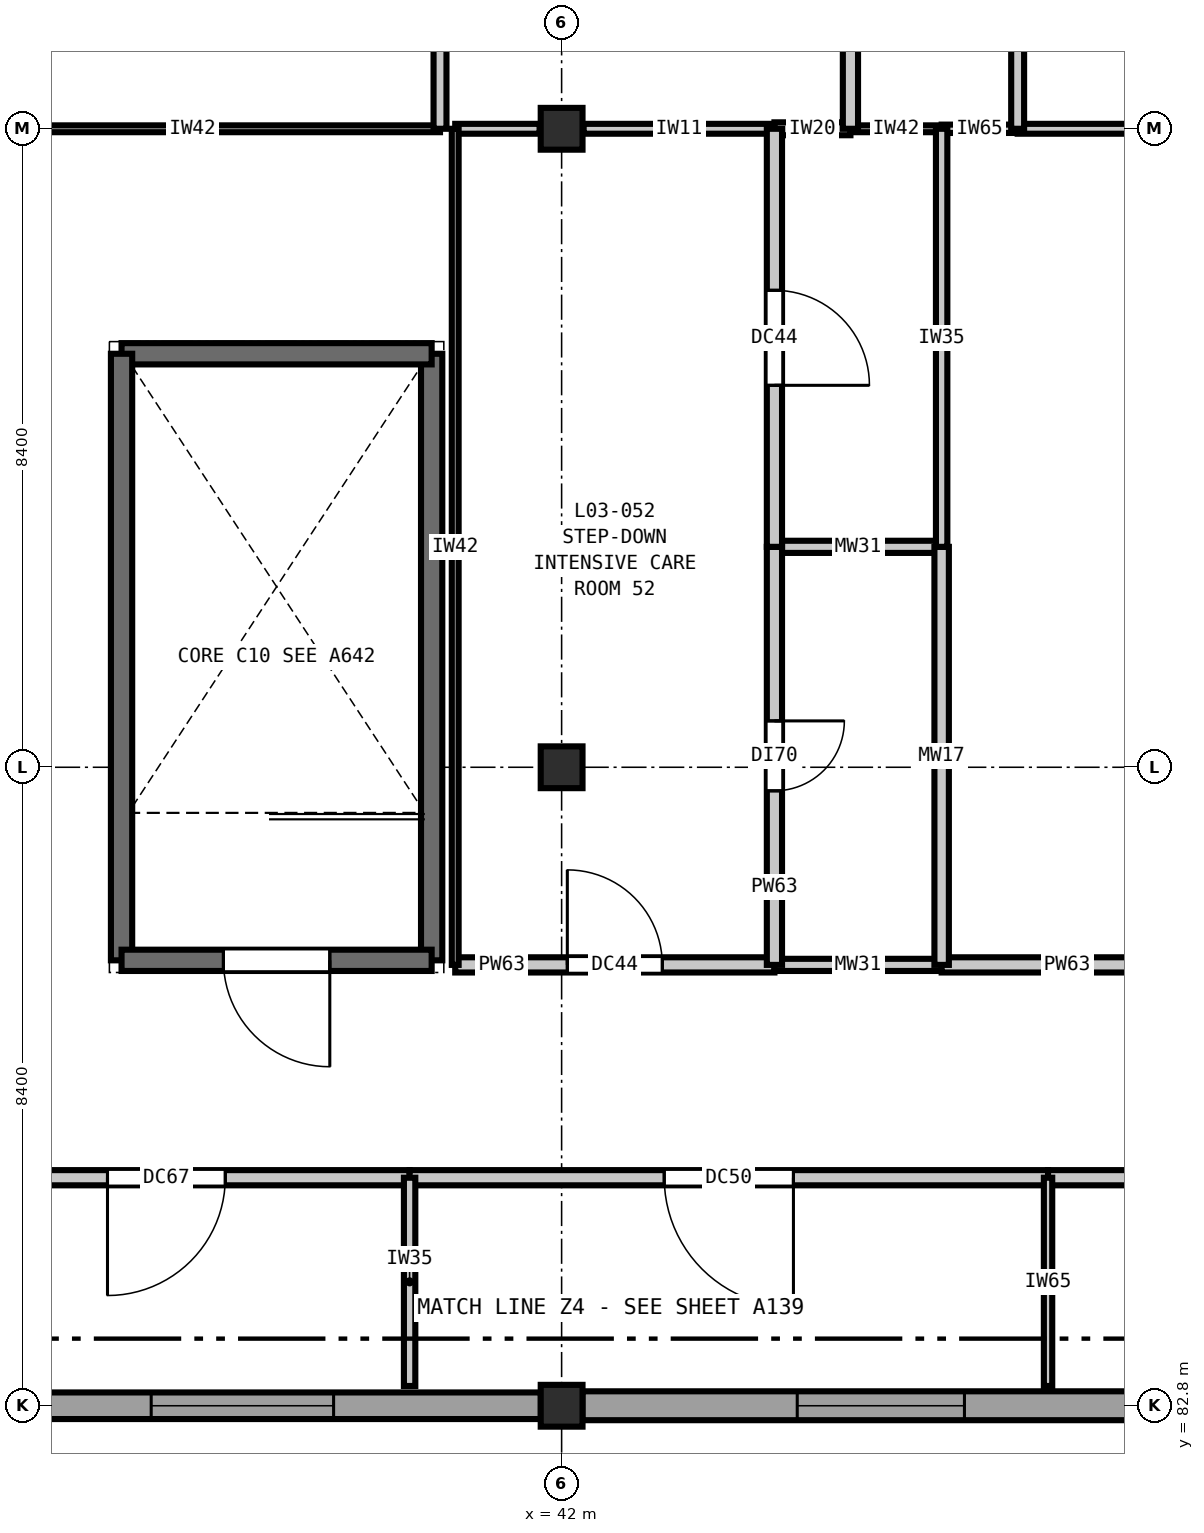
"""IFC4 building model, lengths in metres.
Left out: names, types, materials, properties, quantities, classifications, styles, units other than length and angle.
Written with IfcOpenShell. Run it as: python <this file> out.ifc"""

import sys

from ifc_helpers import new_model, si_unit, direction, frame, frame_2d, origin, origin_2d, place, context, subcontext, project, spatial, rectangle, extrude, element, fill, save


model = new_model("IFC4")
c1 = context("Model", 3, precision=1e-05, world=origin(), true_north=direction((0.0, 1.0)))
c2 = subcontext(c1, "Body", "Model", "MODEL_VIEW")
j1 = project(units=[si_unit("LENGTHUNIT", "METRE"), si_unit("PLANEANGLEUNIT", "RADIAN")], contexts=[c1])
p1 = place(None, origin())
s1 = spatial("IfcSite", under=j1, at=p1, CompositionType="ELEMENT")
p2 = place(p1, origin())
s2 = spatial("IfcBuilding", under=s1, at=p2, CompositionType="ELEMENT")
p3 = place(p2, frame((0.0, 0.0, 16.2)))
s3 = spatial("IfcBuildingStorey", under=s2, at=p3, CompositionType="ELEMENT", Elevation=16.2)
for number, where, z_axis, x_axis in (
    (1, (42.0, 82.8, 0.0), (0.0, 0.0, 1.0), (1.0, 0.0, 0.0)),
    (2, (42.0, 91.2, 0.0), (0.0, 0.0, 1.0), (1.0, 0.0, 0.0)),
    (3, (42.0, 99.6, 0.0), (0.0, 0.0, 1.0), (1.0, 0.0, 0.0)),
):
    element("IfcColumn", number, at=place(p3, frame(where, z_axis=z_axis, x_axis=x_axis)), inside=s3, PredefinedType="COLUMN", context=c2, shape_type="SweptSolid", body=[
        extrude(rectangle(XDim=0.55, YDim=0.55, at=origin_2d()), origin(), (0.0, 0.0, 1.0), 4.2),
    ])
p4 = place(p3, frame((50.127, 82.8, 0.0), z_axis=(0.0, 0.0, 1.0), x_axis=(-1.0, 0.0, 0.0)))
e4 = element("IfcWall", 4, at=p4, inside=s3, PredefinedType="SOLIDWALL", context=c2, shape_type="SweptSolid", body=[
    extrude(rectangle(XDim=7.854, YDim=0.38, at=frame_2d((3.927, 0.0))), origin(), (0.0, 0.0, 1.0), 3.48),
])
p5 = place(p4, frame((2.827, 0.0, 0.9)))
e5 = element("IfcOpeningElement", 5, at=p5, cuts=e4, PredefinedType="OPENING", context=c2, shape_type="SweptSolid", body=[
    extrude(rectangle(XDim=2.2, YDim=1.95, at=frame_2d((1.1, 0.975))), frame((0.0, 0.2, 0.0), z_axis=(0.0, -1.0, 0.0), x_axis=(1.0, 0.0, 0.0)), (0.0, 0.0, 1.0), 0.4),
])
p6 = place(p3, frame((41.727, 82.8, 0.0), z_axis=(0.0, 0.0, 1.0), x_axis=(-1.0, 0.0, 0.0)))
e6 = element("IfcWall", 6, at=p6, inside=s3, PredefinedType="SOLIDWALL", context=c2, shape_type="SweptSolid", body=[
    extrude(rectangle(XDim=7.854, YDim=0.35, at=frame_2d((3.927, 0.0))), origin(), (0.0, 0.0, 1.0), 3.48),
])
p7 = place(p6, frame((2.727, 0.0, 0.9)))
e7 = element("IfcOpeningElement", 7, at=p7, cuts=e6, PredefinedType="OPENING", context=c2, shape_type="SweptSolid", body=[
    extrude(rectangle(XDim=2.4, YDim=1.95, at=frame_2d((1.2, 0.975))), frame((0.0, 0.185, 0.0), z_axis=(0.0, -1.0, 0.0), x_axis=(1.0, 0.0, 0.0)), (0.0, 0.0, 1.0), 0.37),
])
p8 = place(p3, frame((40.29, 88.66, 0.0), z_axis=(0.0, 0.0, 1.0), x_axis=(0.0, 1.0, 0.0)))
e8 = element("IfcWall", 8, at=p8, inside=s3, PredefinedType="SHEAR", context=c2, shape_type="SweptSolid", body=[
    extrude(rectangle(XDim=7.98, YDim=0.28, at=frame_2d((3.99, 0.0))), origin(), (0.0, 0.0, 1.0), 4.2),
])
p9 = place(p3, frame((40.29, 96.64, 0.0), z_axis=(0.0, 0.0, 1.0), x_axis=(-1.0, 0.0, 0.0)))
e9 = element("IfcWall", 9, at=p9, inside=s3, PredefinedType="SHEAR", context=c2, shape_type="SweptSolid", body=[
    extrude(rectangle(XDim=4.08, YDim=0.28, at=frame_2d((2.04, 0.0))), origin(), (0.0, 0.0, 1.0), 4.2),
])
p10 = place(p3, frame((36.21, 96.64, 0.0), z_axis=(0.0, 0.0, 1.0), x_axis=(0.0, -1.0, 0.0)))
e10 = element("IfcWall", 10, at=p10, inside=s3, PredefinedType="SHEAR", context=c2, shape_type="SweptSolid", body=[
    extrude(rectangle(XDim=7.98, YDim=0.28, at=frame_2d((3.99, 0.0))), origin(), (0.0, 0.0, 1.0), 4.2),
])
p11 = place(p3, frame((36.21, 88.66, 0.0), z_axis=(0.0, 0.0, 1.0), x_axis=(1.0, 0.0, 0.0)))
e11 = element("IfcWall", 11, at=p11, inside=s3, PredefinedType="SHEAR", context=c2, shape_type="SweptSolid", body=[
    extrude(rectangle(XDim=4.08, YDim=0.28, at=frame_2d((2.04, 0.0))), origin(), (0.0, 0.0, 1.0), 4.2),
])
p12 = place(p11, frame((1.34, 0.0, 0.0)))
e12 = element("IfcOpeningElement", 12, at=p12, cuts=e11, PredefinedType="OPENING", context=c2, shape_type="SweptSolid", body=[
    extrude(rectangle(XDim=1.4, YDim=2.2, at=frame_2d((0.7, 1.1))), frame((0.0, 0.15, 0.0), z_axis=(0.0, -1.0, 0.0), x_axis=(1.0, 0.0, 0.0)), (0.0, 0.0, 1.0), 0.3),
])
p13 = place(p3, frame((33.6, 85.8, 0.0), z_axis=(0.0, 0.0, 1.0), x_axis=(1.0, 0.0, 0.0)))
e13 = element("IfcWall", 13, at=p13, inside=s3, PredefinedType="PARTITIONING", context=c2, shape_type="SweptSolid", body=[
    extrude(rectangle(XDim=6.4, YDim=0.2, at=frame_2d((3.2, 0.0))), origin(), (0.0, 0.0, 1.0), 3.89),
])
p14 = place(p13, frame((2.425, 0.0, 0.0)))
e14 = element("IfcOpeningElement", 14, at=p14, cuts=e13, PredefinedType="OPENING", context=c2, shape_type="SweptSolid", body=[
    extrude(rectangle(XDim=1.55, YDim=2.25, at=frame_2d((0.775, 1.125))), frame((0.0, 0.11, 0.0), z_axis=(0.0, -1.0, 0.0), x_axis=(1.0, 0.0, 0.0)), (0.0, 0.0, 1.0), 0.22),
])
p15 = place(p3, frame((40.0, 85.8, 0.0), z_axis=(0.0, 0.0, 1.0), x_axis=(1.0, 0.0, 0.0)))
e15 = element("IfcWall", 15, at=p15, inside=s3, PredefinedType="PARTITIONING", context=c2, shape_type="SweptSolid", body=[
    extrude(rectangle(XDim=8.4, YDim=0.2, at=frame_2d((4.2, 0.0))), origin(), (0.0, 0.0, 1.0), 3.89),
])
p16 = place(p15, frame((3.35, 0.0, 0.0)))
e16 = element("IfcOpeningElement", 16, at=p16, cuts=e15, PredefinedType="OPENING", context=c2, shape_type="SweptSolid", body=[
    extrude(rectangle(XDim=1.7, YDim=2.3, at=frame_2d((0.85, 1.15))), frame((0.0, 0.11, 0.0), z_axis=(0.0, -1.0, 0.0), x_axis=(1.0, 0.0, 0.0)), (0.0, 0.0, 1.0), 0.22),
])
p17 = place(p3, frame((48.4, 85.8, 0.0), z_axis=(0.0, 0.0, 1.0), x_axis=(1.0, 0.0, 0.0)))
e17 = element("IfcWall", 17, at=p17, inside=s3, PredefinedType="PARTITIONING", context=c2, shape_type="SweptSolid", body=[
    extrude(rectangle(XDim=6.4, YDim=0.2, at=frame_2d((3.2, 0.0))), origin(), (0.0, 0.0, 1.0), 3.89),
])
p18 = place(p17, frame((2.275, 0.0, 0.0)))
e18 = element("IfcOpeningElement", 18, at=p18, cuts=e17, PredefinedType="OPENING", context=c2, shape_type="SweptSolid", body=[
    extrude(rectangle(XDim=1.85, YDim=2.3, at=frame_2d((0.925, 1.15))), frame((0.0, 0.11, 0.0), z_axis=(0.0, -1.0, 0.0), x_axis=(1.0, 0.0, 0.0)), (0.0, 0.0, 1.0), 0.22),
])
p19 = place(p3, frame((40.6, 88.6, 0.0), z_axis=(0.0, 0.0, 1.0), x_axis=(1.0, 0.0, 0.0)))
e19 = element("IfcWall", 19, at=p19, inside=s3, PredefinedType="PARTITIONING", context=c2, shape_type="SweptSolid", body=[
    extrude(rectangle(XDim=4.2, YDim=0.2, at=frame_2d((2.1, 0.0))), origin(), (0.0, 0.0, 1.0), 3.89),
])
p20 = place(p19, frame((1.475, 0.0, 0.0)))
e20 = element("IfcOpeningElement", 20, at=p20, cuts=e19, PredefinedType="OPENING", context=c2, shape_type="SweptSolid", body=[
    extrude(rectangle(XDim=1.25, YDim=2.15, at=frame_2d((0.625, 1.075))), frame((0.0, 0.11, 0.0), z_axis=(0.0, -1.0, 0.0), x_axis=(1.0, 0.0, 0.0)), (0.0, 0.0, 1.0), 0.22),
])
p21 = place(p3, frame((44.8, 88.6, 0.0), z_axis=(0.0, 0.0, 1.0), x_axis=(1.0, 0.0, 0.0)))
e21 = element("IfcWall", 21, at=p21, inside=s3, PredefinedType="PLUMBINGWALL", context=c2, shape_type="SweptSolid", body=[
    extrude(rectangle(XDim=2.2, YDim=0.16, at=frame_2d((1.1, 0.0))), origin(), (0.0, 0.0, 1.0), 3.89),
])
p22 = place(p3, frame((47.0, 88.6, 0.0), z_axis=(0.0, 0.0, 1.0), x_axis=(1.0, 0.0, 0.0)))
e22 = element("IfcWall", 22, at=p22, inside=s3, PredefinedType="PARTITIONING", context=c2, shape_type="SweptSolid", body=[
    extrude(rectangle(XDim=8.4, YDim=0.2, at=frame_2d((4.2, 0.0))), origin(), (0.0, 0.0, 1.0), 3.89),
])
p23 = place(p22, frame((3.55, 0.0, 0.0)))
e23 = element("IfcOpeningElement", 23, at=p23, cuts=e22, PredefinedType="OPENING", context=c2, shape_type="SweptSolid", body=[
    extrude(rectangle(XDim=1.3, YDim=2.2, at=frame_2d((0.65, 1.1))), frame((0.0, 0.11, 0.0), z_axis=(0.0, -1.0, 0.0), x_axis=(1.0, 0.0, 0.0)), (0.0, 0.0, 1.0), 0.22),
])
p24 = place(p3, frame((44.8, 94.1, 0.0), z_axis=(0.0, 0.0, 1.0), x_axis=(1.0, 0.0, 0.0)))
e24 = element("IfcWall", 24, at=p24, inside=s3, PredefinedType="PLUMBINGWALL", context=c2, shape_type="SweptSolid", body=[
    extrude(rectangle(XDim=2.2, YDim=0.16, at=frame_2d((1.1, 0.0))), origin(), (0.0, 0.0, 1.0), 3.89),
])
p25 = place(p3, frame((33.89, 99.6, 0.0), z_axis=(0.0, 0.0, 1.0), x_axis=(1.0, 0.0, 0.0)))
e25 = element("IfcWall", 25, at=p25, inside=s3, PredefinedType="PARTITIONING", context=c2, shape_type="SweptSolid", body=[
    extrude(rectangle(XDim=6.51, YDim=0.09, at=frame_2d((3.255, 0.0))), origin(), (0.0, 0.0, 1.0), 3.535),
])
p26 = place(p3, frame((42.29, 99.6, 0.0), z_axis=(0.0, 0.0, 1.0), x_axis=(1.0, 0.0, 0.0)))
e26 = element("IfcWall", 26, at=p26, inside=s3, PredefinedType="PARTITIONING", context=c2, shape_type="SweptSolid", body=[
    extrude(rectangle(XDim=2.51, YDim=0.13, at=frame_2d((1.255, 0.0))), origin(), (0.0, 0.0, 1.0), 3.535),
])
p27 = place(p3, frame((40.6, 99.6, 0.0), z_axis=(0.0, 0.0, 1.0), x_axis=(1.0, 0.0, 0.0)))
e27 = element("IfcWall", 27, at=p27, inside=s3, PredefinedType="PARTITIONING", context=c2, shape_type="SweptSolid", body=[
    extrude(rectangle(XDim=1.11, YDim=0.13, at=frame_2d((0.555, 0.0))), origin(), (0.0, 0.0, 1.0), 3.535),
])
p28 = place(p3, frame((44.8, 99.6, 0.0), z_axis=(0.0, 0.0, 1.0), x_axis=(1.0, 0.0, 0.0)))
e28 = element("IfcWall", 28, at=p28, inside=s3, PredefinedType="PARTITIONING", context=c2, shape_type="SweptSolid", body=[
    extrude(rectangle(XDim=1.0, YDim=0.17, at=frame_2d((0.5, 0.0))), origin(), (0.0, 0.0, 1.0), 3.535),
])
p29 = place(p3, frame((45.8, 99.6, 0.0), z_axis=(0.0, 0.0, 1.0), x_axis=(1.0, 0.0, 0.0)))
e29 = element("IfcWall", 29, at=p29, inside=s3, PredefinedType="PARTITIONING", context=c2, shape_type="SweptSolid", body=[
    extrude(rectangle(XDim=1.2, YDim=0.09, at=frame_2d((0.6, 0.0))), origin(), (0.0, 0.0, 1.0), 3.535),
])
p30 = place(p3, frame((47.0, 99.6, 0.0), z_axis=(0.0, 0.0, 1.0), x_axis=(1.0, 0.0, 0.0)))
e30 = element("IfcWall", 30, at=p30, inside=s3, PredefinedType="PARTITIONING", context=c2, shape_type="SweptSolid", body=[
    extrude(rectangle(XDim=1.0, YDim=0.11, at=frame_2d((0.5, 0.0))), origin(), (0.0, 0.0, 1.0), 3.535),
])
p31 = place(p3, frame((48.0, 99.6, 0.0), z_axis=(0.0, 0.0, 1.0), x_axis=(1.0, 0.0, 0.0)))
e31 = element("IfcWall", 31, at=p31, inside=s3, PredefinedType="PARTITIONING", context=c2, shape_type="SweptSolid", body=[
    extrude(rectangle(XDim=2.11, YDim=0.13, at=frame_2d((1.055, 0.0))), origin(), (0.0, 0.0, 1.0), 3.535),
])
p32 = place(p3, frame((40.0, 83.06, 0.0), z_axis=(0.0, 0.0, 1.0), x_axis=(0.0, 1.0, 0.0)))
e32 = element("IfcWall", 32, at=p32, inside=s3, PredefinedType="PARTITIONING", context=c2, shape_type="SweptSolid", body=[
    extrude(rectangle(XDim=2.74, YDim=0.15, at=frame_2d((1.37, 0.0))), origin(), (0.0, 0.0, 1.0), 3.89),
])
p33 = place(p3, frame((40.4, 99.6, 0.0), z_axis=(0.0, 0.0, 1.0), x_axis=(0.0, 1.0, 0.0)))
e33 = element("IfcWall", 33, at=p33, inside=s3, PredefinedType="PARTITIONING", context=c2, shape_type="SweptSolid", body=[
    extrude(rectangle(XDim=13.6, YDim=0.17, at=frame_2d((6.8, 0.0))), origin(), (0.0, 0.0, 1.0), 3.89),
])
p34 = place(p3, frame((40.6, 88.6, 0.0), z_axis=(0.0, 0.0, 1.0), x_axis=(0.0, 1.0, 0.0)))
e34 = element("IfcWall", 34, at=p34, inside=s3, PredefinedType="PARTITIONING", context=c2, shape_type="SweptSolid", body=[
    extrude(rectangle(XDim=11.0, YDim=0.09, at=frame_2d((5.5, 0.0))), origin(), (0.0, 0.0, 1.0), 3.89),
])
p35 = place(p3, frame((44.8, 88.6, 0.0), z_axis=(0.0, 0.0, 1.0), x_axis=(0.0, 1.0, 0.0)))
e35 = element("IfcWall", 35, at=p35, inside=s3, PredefinedType="PARTITIONING", context=c2, shape_type="SweptSolid", body=[
    extrude(rectangle(XDim=5.5, YDim=0.2, at=frame_2d((2.75, 0.0))), origin(), (0.0, 0.0, 1.0), 3.89),
])
p36 = place(p35, frame((2.29, 0.0, 0.0)))
e36 = element("IfcOpeningElement", 36, at=p36, cuts=e35, PredefinedType="OPENING", context=c2, shape_type="SweptSolid", body=[
    extrude(rectangle(XDim=0.92, YDim=2.1, at=frame_2d((0.46, 1.05))), frame((0.0, 0.11, 0.0), z_axis=(0.0, -1.0, 0.0), x_axis=(1.0, 0.0, 0.0)), (0.0, 0.0, 1.0), 0.22),
])
p37 = place(p3, frame((44.8, 94.1, 0.0), z_axis=(0.0, 0.0, 1.0), x_axis=(0.0, 1.0, 0.0)))
e37 = element("IfcWall", 37, at=p37, inside=s3, PredefinedType="PARTITIONING", context=c2, shape_type="SweptSolid", body=[
    extrude(rectangle(XDim=5.5, YDim=0.2, at=frame_2d((2.75, 0.0))), origin(), (0.0, 0.0, 1.0), 3.89),
])
p38 = place(p37, frame((2.125, 0.0, 0.0)))
e38 = element("IfcOpeningElement", 38, at=p38, cuts=e37, PredefinedType="OPENING", context=c2, shape_type="SweptSolid", body=[
    extrude(rectangle(XDim=1.25, YDim=2.15, at=frame_2d((0.625, 1.075))), frame((0.0, 0.11, 0.0), z_axis=(0.0, -1.0, 0.0), x_axis=(1.0, 0.0, 0.0)), (0.0, 0.0, 1.0), 0.22),
])
p39 = place(p3, frame((45.8, 99.6, 0.0), z_axis=(0.0, 0.0, 1.0), x_axis=(0.0, 1.0, 0.0)))
e39 = element("IfcWall", 39, at=p39, inside=s3, PredefinedType="PARTITIONING", context=c2, shape_type="SweptSolid", body=[
    extrude(rectangle(XDim=6.8, YDim=0.2, at=frame_2d((3.4, 0.0))), origin(), (0.0, 0.0, 1.0), 3.89),
])
p40 = place(p39, frame((2.75, 0.0, 0.0)))
e40 = element("IfcOpeningElement", 40, at=p40, cuts=e39, PredefinedType="OPENING", context=c2, shape_type="SweptSolid", body=[
    extrude(rectangle(XDim=1.3, YDim=2.2, at=frame_2d((0.65, 1.1))), frame((0.0, 0.11, 0.0), z_axis=(0.0, -1.0, 0.0), x_axis=(1.0, 0.0, 0.0)), (0.0, 0.0, 1.0), 0.22),
])
p41 = place(p3, frame((47.0, 88.6, 0.0), z_axis=(0.0, 0.0, 1.0), x_axis=(0.0, 1.0, 0.0)))
e41 = element("IfcWall", 41, at=p41, inside=s3, PredefinedType="PLUMBINGWALL", context=c2, shape_type="SweptSolid", body=[
    extrude(rectangle(XDim=5.5, YDim=0.19, at=frame_2d((2.75, 0.0))), origin(), (0.0, 0.0, 1.0), 3.89),
])
p42 = place(p3, frame((47.0, 94.1, 0.0), z_axis=(0.0, 0.0, 1.0), x_axis=(0.0, 1.0, 0.0)))
e42 = element("IfcWall", 42, at=p42, inside=s3, PredefinedType="PARTITIONING", context=c2, shape_type="SweptSolid", body=[
    extrude(rectangle(XDim=5.5, YDim=0.15, at=frame_2d((2.75, 0.0))), origin(), (0.0, 0.0, 1.0), 3.89),
])
p43 = place(p3, frame((48.0, 99.6, 0.0), z_axis=(0.0, 0.0, 1.0), x_axis=(0.0, 1.0, 0.0)))
e43 = element("IfcWall", 43, at=p43, inside=s3, PredefinedType="PARTITIONING", context=c2, shape_type="SweptSolid", body=[
    extrude(rectangle(XDim=6.8, YDim=0.17, at=frame_2d((3.4, 0.0))), origin(), (0.0, 0.0, 1.0), 3.89),
])
p44 = place(p3, frame((48.4, 83.06, 0.0), z_axis=(0.0, 0.0, 1.0), x_axis=(0.0, 1.0, 0.0)))
e44 = element("IfcWall", 44, at=p44, inside=s3, PredefinedType="PARTITIONING", context=c2, shape_type="SweptSolid", body=[
    extrude(rectangle(XDim=2.74, YDim=0.11, at=frame_2d((1.37, 0.0))), origin(), (0.0, 0.0, 1.0), 3.89),
])
p45 = place(p5, origin())
e45 = element("IfcWindow", 45, at=p45, inside=s3, PartitioningType="DOUBLE_PANEL_VERTICAL", PredefinedType="WINDOW", context=c2, shape_type="SweptSolid", body=[
    extrude(rectangle(XDim=2.2, YDim=1.95, at=frame_2d((1.1, 0.975))), frame((0.0, 0.03, 0.0), z_axis=(0.0, -1.0, 0.0), x_axis=(1.0, 0.0, 0.0)), (0.0, 0.0, 1.0), 0.06),
])
fill(e5, e45)
p46 = place(p7, origin())
e46 = element("IfcWindow", 46, at=p46, inside=s3, PartitioningType="DOUBLE_PANEL_VERTICAL", PredefinedType="WINDOW", context=c2, shape_type="SweptSolid", body=[
    extrude(rectangle(XDim=2.4, YDim=1.95, at=frame_2d((1.2, 0.975))), frame((0.0, 0.03, 0.0), z_axis=(0.0, -1.0, 0.0), x_axis=(1.0, 0.0, 0.0)), (0.0, 0.0, 1.0), 0.06),
])
fill(e7, e46)
p47 = place(p12, frame((1.4, 0.0, 0.0), z_axis=(0.0, 0.0, 1.0), x_axis=(-1.0, 0.0, 0.0)))
e47 = element("IfcDoor", 47, at=p47, inside=s3, OperationType="SINGLE_SWING_LEFT", PredefinedType="DOOR", context=c2, shape_type="SweptSolid", body=[
    extrude(rectangle(XDim=1.4, YDim=2.2, at=frame_2d((0.7, 1.1))), frame((0.0, 0.025, 0.0), z_axis=(0.0, -1.0, 0.0), x_axis=(1.0, 0.0, 0.0)), (0.0, 0.0, 1.0), 0.05),
])
fill(e12, e47)
p48 = place(p14, frame((1.55, 0.0, 0.0), z_axis=(0.0, 0.0, 1.0), x_axis=(-1.0, 0.0, 0.0)))
e48 = element("IfcDoor", 48, at=p48, inside=s3, OperationType="SINGLE_SWING_RIGHT", PredefinedType="DOOR", context=c2, shape_type="SweptSolid", body=[
    extrude(rectangle(XDim=1.55, YDim=2.25, at=frame_2d((0.775, 1.125))), frame((0.0, 0.025, 0.0), z_axis=(0.0, -1.0, 0.0), x_axis=(1.0, 0.0, 0.0)), (0.0, 0.0, 1.0), 0.05),
])
fill(e14, e48)
p49 = place(p16, frame((1.7, 0.0, 0.0), z_axis=(0.0, 0.0, 1.0), x_axis=(-1.0, 0.0, 0.0)))
e49 = element("IfcDoor", 49, at=p49, inside=s3, OperationType="SINGLE_SWING_LEFT", PredefinedType="DOOR", context=c2, shape_type="SweptSolid", body=[
    extrude(rectangle(XDim=1.7, YDim=2.3, at=frame_2d((0.85, 1.15))), frame((0.0, 0.025, 0.0), z_axis=(0.0, -1.0, 0.0), x_axis=(1.0, 0.0, 0.0)), (0.0, 0.0, 1.0), 0.05),
])
fill(e16, e49)
p50 = place(p20, origin())
e50 = element("IfcDoor", 50, at=p50, inside=s3, OperationType="SINGLE_SWING_LEFT", PredefinedType="DOOR", context=c2, shape_type="SweptSolid", body=[
    extrude(rectangle(XDim=1.25, YDim=2.15, at=frame_2d((0.625, 1.075))), frame((0.0, 0.025, 0.0), z_axis=(0.0, -1.0, 0.0), x_axis=(1.0, 0.0, 0.0)), (0.0, 0.0, 1.0), 0.05),
])
fill(e20, e50)
p51 = place(p36, frame((0.92, 0.0, 0.0), z_axis=(0.0, 0.0, 1.0), x_axis=(-1.0, 0.0, 0.0)))
e51 = element("IfcDoor", 51, at=p51, inside=s3, OperationType="SINGLE_SWING_LEFT", PredefinedType="DOOR", context=c2, shape_type="SweptSolid", body=[
    extrude(rectangle(XDim=0.92, YDim=2.1, at=frame_2d((0.46, 1.05))), frame((0.0, 0.025, 0.0), z_axis=(0.0, -1.0, 0.0), x_axis=(1.0, 0.0, 0.0)), (0.0, 0.0, 1.0), 0.05),
])
fill(e36, e51)
p52 = place(p38, frame((1.25, 0.0, 0.0), z_axis=(0.0, 0.0, 1.0), x_axis=(-1.0, 0.0, 0.0)))
e52 = element("IfcDoor", 52, at=p52, inside=s3, OperationType="SINGLE_SWING_RIGHT", PredefinedType="DOOR", context=c2, shape_type="SweptSolid", body=[
    extrude(rectangle(XDim=1.25, YDim=2.15, at=frame_2d((0.625, 1.075))), frame((0.0, 0.025, 0.0), z_axis=(0.0, -1.0, 0.0), x_axis=(1.0, 0.0, 0.0)), (0.0, 0.0, 1.0), 0.05),
])
fill(e38, e52)
save(model, sys.argv[1])
